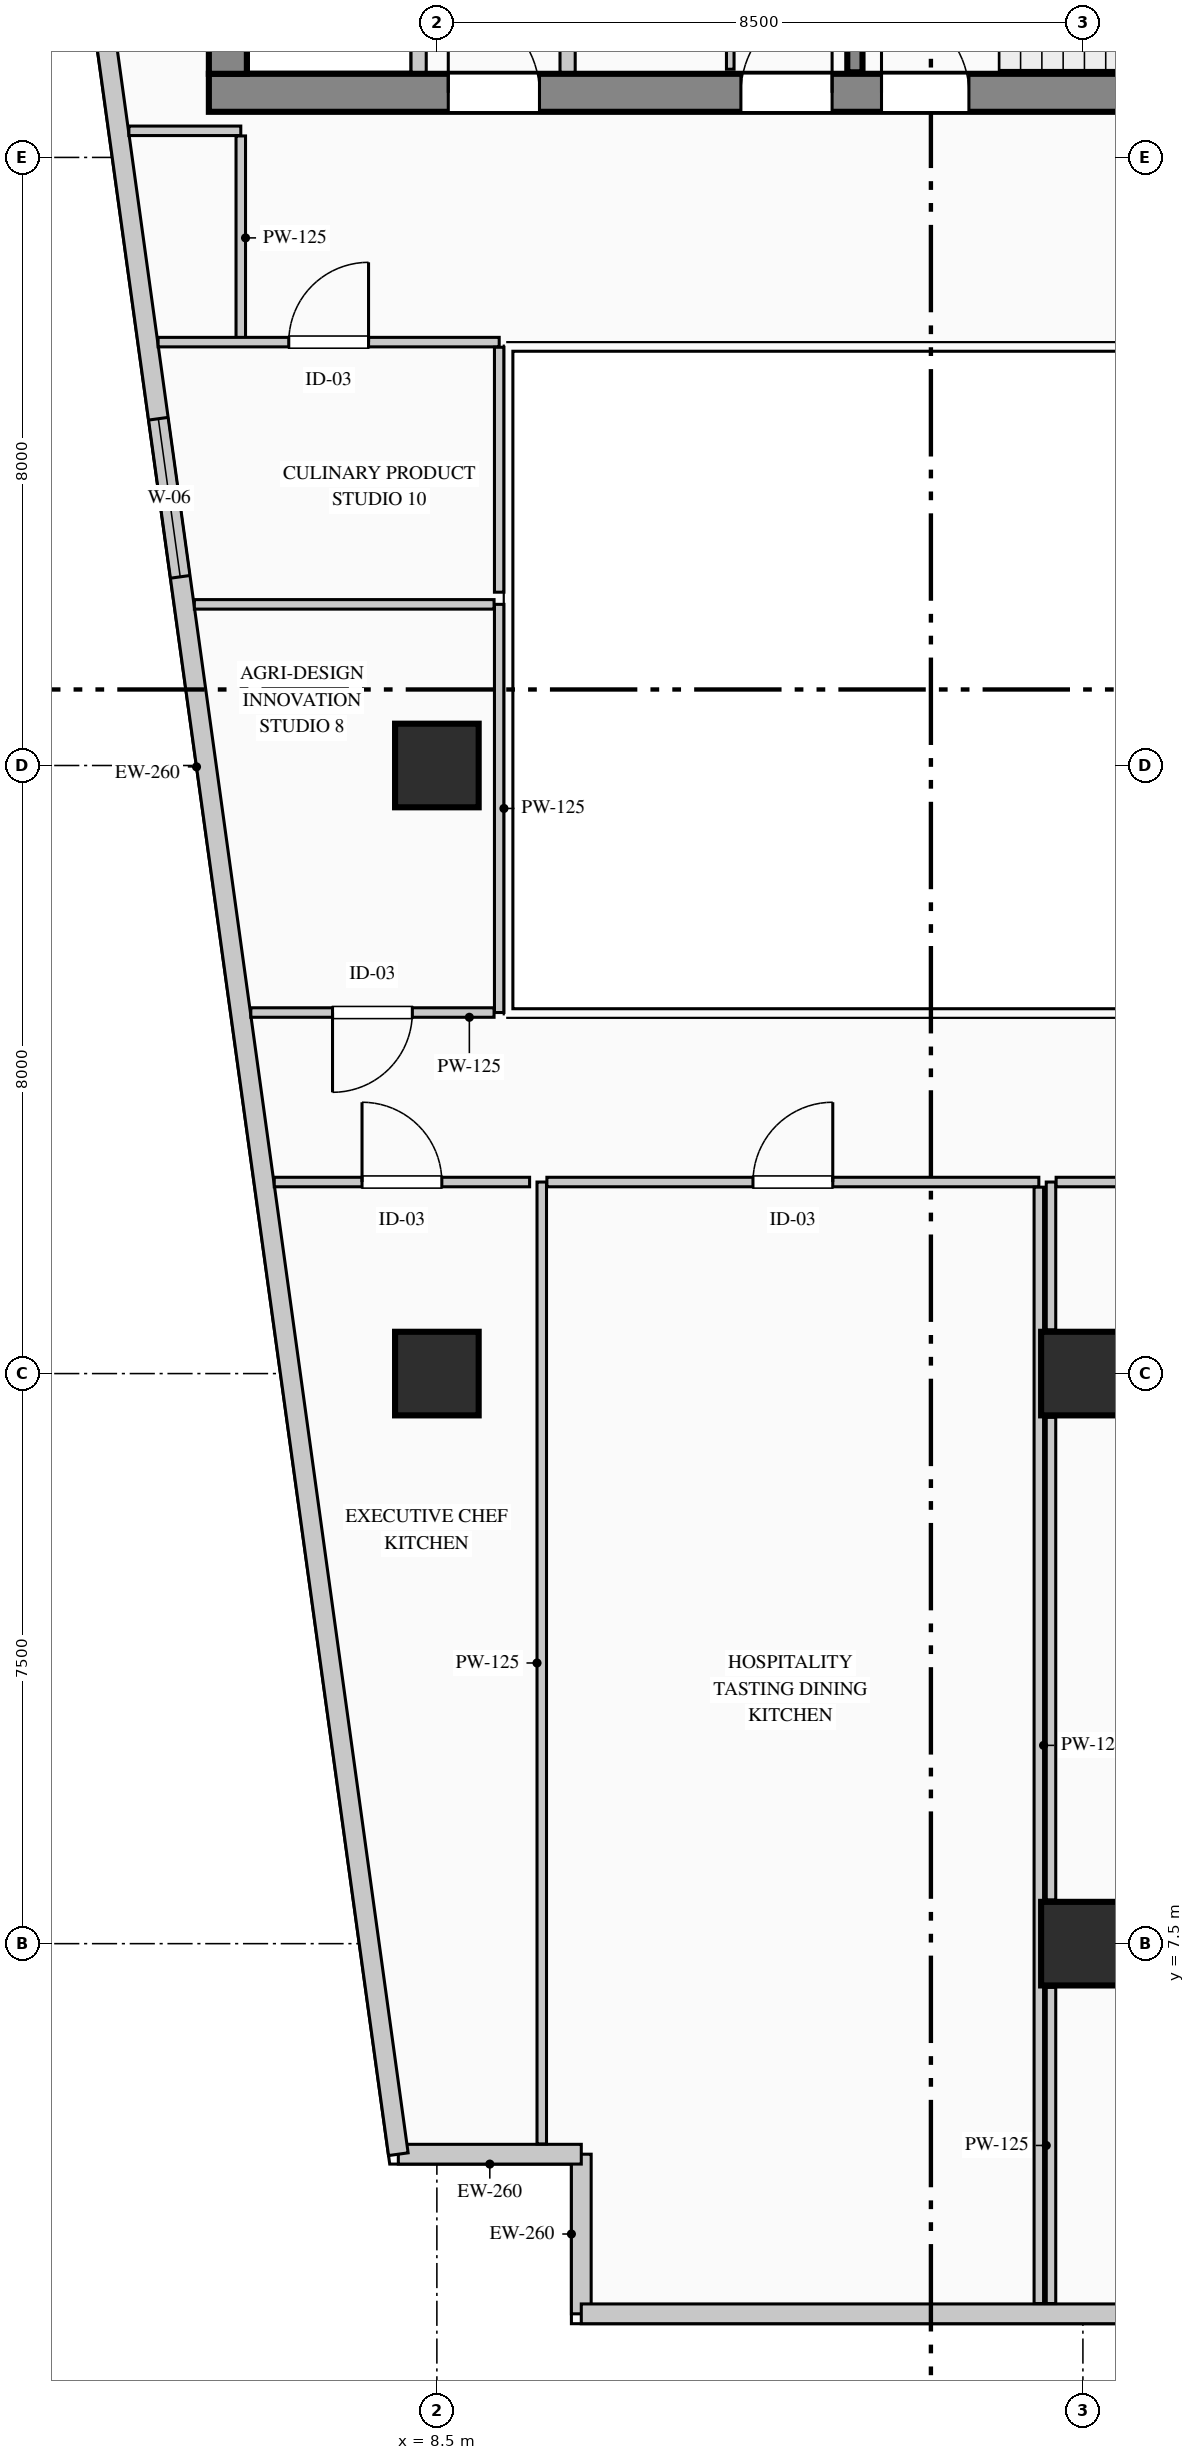
"""IFC4 building model, lengths in metres.
Left out: names, types, materials, properties, quantities, classifications, styles, units other than length and angle.
Written with IfcOpenShell. Run it as: python <this file> out.ifc"""

import sys

from ifc_helpers import new_model, si_unit, direction, frame, frame_2d, origin, origin_2d, place, context, subcontext, project, spatial, rectangle, extrude, element, fill, save


model = new_model("IFC4")
c1 = context("Model", 3, precision=1e-05, world=origin(), true_north=direction((0.0, 1.0)))
c2 = subcontext(c1, "Body", "Model", "MODEL_VIEW")
j1 = project(units=[si_unit("LENGTHUNIT", "METRE"), si_unit("PLANEANGLEUNIT", "RADIAN")], contexts=[c1])
p1 = place(None, origin())
s1 = spatial("IfcSite", under=j1, at=p1, CompositionType="ELEMENT")
p2 = place(p1, origin())
s2 = spatial("IfcBuilding", under=s1, at=p2, CompositionType="ELEMENT")
p3 = place(p2, frame((0.0, 0.0, 170.65)))
s3 = spatial("IfcBuildingStorey", under=s2, at=p3, CompositionType="ELEMENT", Elevation=170.65)
p4 = place(p3, frame((5.5, 31.85, 0.0), z_axis=(0.0, 0.0, 1.0), x_axis=(1.0, 0.0, 0.0)))
e1 = element("IfcWall", 1, at=p4, inside=s3, PredefinedType="SHEAR", context=c2, shape_type="SweptSolid", body=[
    extrude(rectangle(XDim=17.85, YDim=0.5, at=frame_2d((8.925, 0.0))), origin(), (0.0, 0.0, 1.0), 3.95),
])
p5 = place(p4, frame((3.15, 0.0, 0.0)))
e2 = element("IfcOpeningElement", 2, at=p5, cuts=e1, PredefinedType="OPENING", context=c2, shape_type="SweptSolid", body=[
    extrude(rectangle(XDim=1.2, YDim=2.2, at=frame_2d((0.6, 1.1))), frame((0.0, 0.26, 0.0), z_axis=(0.0, -1.0, 0.0), x_axis=(1.0, 0.0, 0.0)), (0.0, 0.0, 1.0), 0.52),
])
p6 = place(p4, frame((7.0, 0.0, 0.0)))
e3 = element("IfcOpeningElement", 3, at=p6, cuts=e1, PredefinedType="OPENING", context=c2, shape_type="SweptSolid", body=[
    extrude(rectangle(XDim=1.2, YDim=2.2, at=frame_2d((0.6, 1.1))), frame((0.0, 0.26, 0.0), z_axis=(0.0, -1.0, 0.0), x_axis=(1.0, 0.0, 0.0)), (0.0, 0.0, 1.0), 0.52),
])
p7 = place(p4, frame((8.85, 0.0, 0.0)))
e4 = element("IfcOpeningElement", 4, at=p7, cuts=e1, PredefinedType="OPENING", context=c2, shape_type="SweptSolid", body=[
    extrude(rectangle(XDim=1.15, YDim=2.2, at=frame_2d((0.575, 1.1))), frame((0.0, 0.26, 0.0), z_axis=(0.0, -1.0, 0.0), x_axis=(1.0, 0.0, 0.0)), (0.0, 0.0, 1.0), 0.52),
])
p8 = place(p4, frame((15.95, 0.0, 0.0)))
e5 = element("IfcOpeningElement", 5, at=p8, cuts=e1, PredefinedType="OPENING", context=c2, shape_type="SweptSolid", body=[
    extrude(rectangle(XDim=1.2, YDim=2.2, at=frame_2d((0.6, 1.1))), frame((0.0, 0.26, 0.0), z_axis=(0.0, -1.0, 0.0), x_axis=(1.0, 0.0, 0.0)), (0.0, 0.0, 1.0), 0.52),
])
p9 = place(p3, frame((5.75, 32.1, 0.0), z_axis=(0.0, 0.0, 1.0), x_axis=(0.0, 1.0, 0.0)))
e6 = element("IfcWall", 6, at=p9, inside=s3, PredefinedType="SHEAR", context=c2, shape_type="SweptSolid", body=[
    extrude(rectangle(XDim=8.3, YDim=0.5, at=frame_2d((4.15, 0.0))), origin(), (0.0, 0.0, 1.0), 3.95),
])
p10 = place(p3, frame((14.0, 32.12, 0.0), z_axis=(0.0, 0.0, 1.0), x_axis=(0.0, 1.0, 0.0)))
e7 = element("IfcWall", 7, at=p10, inside=s3, PredefinedType="SHEAR", context=c2, shape_type="SweptSolid", body=[
    extrude(rectangle(XDim=8.26, YDim=0.2, at=frame_2d((4.13, 0.0))), origin(), (0.0, 0.0, 1.0), 3.95),
])
p11 = place(p10, frame((4.46, 0.0, 0.0)))
e8 = element("IfcOpeningElement", 8, at=p11, cuts=e7, PredefinedType="OPENING", context=c2, shape_type="SweptSolid", body=[
    extrude(rectangle(XDim=1.15, YDim=2.2, at=frame_2d((0.575, 1.1))), frame((0.0, 0.11, 0.0), z_axis=(0.0, -1.0, 0.0), x_axis=(1.0, 0.0, 0.0)), (0.0, 0.0, 1.0), 0.22),
])
for number, where, z_axis, x_axis in (
    (9, (8.5, 15.0, 0.0), (0.0, 0.0, 1.0), (1.0, 0.0, 0.0)),
    (10, (8.5, 23.0, 0.0), (0.0, 0.0, 1.0), (1.0, 0.0, 0.0)),
    (11, (17.0, 7.5, 0.0), (0.0, 0.0, 1.0), (1.0, 0.0, 0.0)),
    (12, (17.0, 15.0, 0.0), (0.0, 0.0, 1.0), (1.0, 0.0, 0.0)),
):
    element("IfcColumn", number, at=place(p3, frame(where, z_axis=z_axis, x_axis=x_axis)), inside=s3, PredefinedType="COLUMN", context=c2, shape_type="SweptSolid", body=[
        extrude(rectangle(XDim=1.1, YDim=1.1, at=origin_2d()), origin(), (0.0, 0.0, 1.0), 3.95),
    ])
p12 = place(p3, frame((10.4, 2.63, 0.0), z_axis=(0.0, 0.0, 1.0), x_axis=(0.0, 1.0, 0.0)))
e13 = element("IfcWall", 13, at=p12, inside=s3, PredefinedType="STANDARD", context=c2, shape_type="SweptSolid", body=[
    extrude(rectangle(XDim=2.1, YDim=0.26, at=frame_2d((1.05, 0.0))), origin(), (0.0, 0.0, 1.0), 3.69),
])
p13 = place(p3, frame((10.4, 4.73, 0.0), z_axis=(0.0, 0.0, 1.0), x_axis=(-1.0, 0.0, 0.0)))
e14 = element("IfcWall", 14, at=p13, inside=s3, PredefinedType="STANDARD", context=c2, shape_type="SweptSolid", body=[
    extrude(rectangle(XDim=2.407, YDim=0.26, at=frame_2d((1.204, 0.0))), origin(), (0.0, 0.0, 1.0), 3.69),
])
p14 = place(p3, frame((7.993, 4.73, 0.0), z_axis=(0.0, 0.0, 1.0), x_axis=(-0.136989009016, 0.990572567462, 0.0)))
e15 = element("IfcWall", 15, at=p14, inside=s3, PredefinedType="STANDARD", context=c2, shape_type="SweptSolid", body=[
    extrude(rectangle(XDim=36.888, YDim=0.26, at=frame_2d((18.444, 0.0))), origin(), (0.0, 0.0, 1.0), 3.69),
])
p15 = place(p14, frame((20.949, 0.0, 0.9)))
e16 = element("IfcOpeningElement", 16, at=p15, cuts=e15, PredefinedType="OPENING", context=c2, shape_type="SweptSolid", body=[
    extrude(rectangle(XDim=2.1, YDim=2.0, at=frame_2d((1.05, 1.0))), frame((0.0, 0.14, 0.0), z_axis=(0.0, -1.0, 0.0), x_axis=(1.0, 0.0, 0.0)), (0.0, 0.0, 1.0), 0.28),
])
p16 = place(p3, frame((24.11, 2.63, 0.0), z_axis=(0.0, 0.0, 1.0), x_axis=(-1.0, 0.0, 0.0)))
e17 = element("IfcWall", 17, at=p16, inside=s3, PredefinedType="STANDARD", context=c2, shape_type="SweptSolid", body=[
    extrude(rectangle(XDim=13.71, YDim=0.26, at=frame_2d((6.855, 0.0))), origin(), (0.0, 0.0, 1.0), 3.69),
])
p17 = place(p16, frame((3.886, 0.0, 0.9)))
e18 = element("IfcOpeningElement", 18, at=p17, cuts=e17, PredefinedType="OPENING", context=c2, shape_type="SweptSolid", body=[
    extrude(rectangle(XDim=2.1, YDim=2.0, at=frame_2d((1.05, 1.0))), frame((0.0, 0.14, 0.0), z_axis=(0.0, -1.0, 0.0), x_axis=(1.0, 0.0, 0.0)), (0.0, 0.0, 1.0), 0.28),
])
p18 = place(p3, frame((8.26, 32.12, 0.0), z_axis=(0.0, 0.0, 1.0), x_axis=(0.0, 1.0, 0.0)))
e19 = element("IfcWall", 19, at=p18, inside=s3, PredefinedType="PARTITIONING", context=c2, shape_type="SweptSolid", body=[
    extrude(rectangle(XDim=7.5, YDim=0.2, at=frame_2d((3.75, 0.0))), origin(), (0.0, 0.0, 1.0), 3.69),
])
p19 = place(p3, frame((10.22, 32.12, 0.0), z_axis=(0.0, 0.0, 1.0), x_axis=(0.0, 1.0, 0.0)))
e20 = element("IfcWall", 20, at=p19, inside=s3, PredefinedType="PARTITIONING", context=c2, shape_type="SweptSolid", body=[
    extrude(rectangle(XDim=8.26, YDim=0.2, at=frame_2d((4.13, 0.0))), origin(), (0.0, 0.0, 1.0), 3.69),
])
p20 = place(p3, frame((12.36, 32.16, 0.0), z_axis=(0.0, 0.0, 1.0), x_axis=(0.0, 1.0, 0.0)))
e21 = element("IfcWall", 21, at=p20, inside=s3, PredefinedType="PARTITIONING", context=c2, shape_type="SweptSolid", body=[
    extrude(rectangle(XDim=1.62, YDim=0.1, at=frame_2d((0.81, 0.0))), origin(), (0.0, 0.0, 1.0), 3.69),
])
p21 = place(p20, frame((0.38, 0.0, 0.0)))
e22 = element("IfcOpeningElement", 22, at=p21, cuts=e21, PredefinedType="OPENING", context=c2, shape_type="SweptSolid", body=[
    extrude(rectangle(XDim=0.85, YDim=2.1, at=frame_2d((0.425, 1.05))), frame((0.0, 0.06, 0.0), z_axis=(0.0, -1.0, 0.0), x_axis=(1.0, 0.0, 0.0)), (0.0, 0.0, 1.0), 0.12),
])
p22 = place(p3, frame((16.58, 2.765, 0.0), z_axis=(0.0, 0.0, 1.0), x_axis=(0.0, 1.0, 0.0)))
e23 = element("IfcWall", 23, at=p22, inside=s3, PredefinedType="PARTITIONING", context=c2, shape_type="SweptSolid", body=[
    extrude(rectangle(XDim=4.16, YDim=0.125, at=frame_2d((2.08, 0.0))), origin(), (0.0, 0.0, 1.0), 3.69),
])
p23 = place(p3, frame((16.58, 8.075, 0.0), z_axis=(0.0, 0.0, 1.0), x_axis=(0.0, 1.0, 0.0)))
e24 = element("IfcWall", 24, at=p23, inside=s3, PredefinedType="PARTITIONING", context=c2, shape_type="SweptSolid", body=[
    extrude(rectangle(XDim=6.35, YDim=0.125, at=frame_2d((3.175, 0.0))), origin(), (0.0, 0.0, 1.0), 3.69),
])
p24 = place(p3, frame((16.58, 15.575, 0.0), z_axis=(0.0, 0.0, 1.0), x_axis=(0.0, 1.0, 0.0)))
e25 = element("IfcWall", 25, at=p24, inside=s3, PredefinedType="PARTITIONING", context=c2, shape_type="SweptSolid", body=[
    extrude(rectangle(XDim=1.945, YDim=0.125, at=frame_2d((0.973, 0.0))), origin(), (0.0, 0.0, 1.0), 3.69),
])
p25 = place(p3, frame((16.647, 17.52, 0.0), z_axis=(0.0, 0.0, 1.0), x_axis=(1.0, 0.0, 0.0)))
e26 = element("IfcWall", 26, at=p25, inside=s3, PredefinedType="PARTITIONING", context=c2, shape_type="SweptSolid", body=[
    extrude(rectangle(XDim=7.473, YDim=0.125, at=frame_2d((3.736, 0.0))), origin(), (0.0, 0.0, 1.0), 3.69),
])
p26 = place(p25, frame((3.211, 0.0, 0.0)))
e27 = element("IfcOpeningElement", 27, at=p26, cuts=e26, PredefinedType="OPENING", context=c2, shape_type="SweptSolid", body=[
    extrude(rectangle(XDim=1.05, YDim=2.15, at=frame_2d((0.525, 1.075))), frame((0.0, 0.073, 0.0), z_axis=(0.0, -1.0, 0.0), x_axis=(1.0, 0.0, 0.0)), (0.0, 0.0, 1.0), 0.145),
])
p27 = place(p3, frame((9.88, 4.865, 0.0), z_axis=(0.0, 0.0, 1.0), x_axis=(0.0, 1.0, 0.0)))
e28 = element("IfcWall", 28, at=p27, inside=s3, PredefinedType="PARTITIONING", context=c2, shape_type="SweptSolid", body=[
    extrude(rectangle(XDim=12.655, YDim=0.125, at=frame_2d((6.328, 0.0))), origin(), (0.0, 0.0, 1.0), 3.69),
])
p28 = place(p3, frame((9.948, 17.52, 0.0), z_axis=(0.0, 0.0, 1.0), x_axis=(1.0, 0.0, 0.0)))
e29 = element("IfcWall", 29, at=p28, inside=s3, PredefinedType="PARTITIONING", context=c2, shape_type="SweptSolid", body=[
    extrude(rectangle(XDim=6.472, YDim=0.125, at=frame_2d((3.236, 0.0))), origin(), (0.0, 0.0, 1.0), 3.69),
])
p29 = place(p28, frame((2.711, 0.0, 0.0)))
e30 = element("IfcOpeningElement", 30, at=p29, cuts=e29, PredefinedType="OPENING", context=c2, shape_type="SweptSolid", body=[
    extrude(rectangle(XDim=1.05, YDim=2.15, at=frame_2d((0.525, 1.075))), frame((0.0, 0.073, 0.0), z_axis=(0.0, -1.0, 0.0), x_axis=(1.0, 0.0, 0.0)), (0.0, 0.0, 1.0), 0.145),
])
p30 = place(p3, frame((16.42, 17.452, 0.0), z_axis=(0.0, 0.0, 1.0), x_axis=(0.0, -1.0, 0.0)))
e31 = element("IfcWall", 31, at=p30, inside=s3, PredefinedType="PARTITIONING", context=c2, shape_type="SweptSolid", body=[
    extrude(rectangle(XDim=14.688, YDim=0.125, at=frame_2d((7.344, 0.0))), origin(), (0.0, 0.0, 1.0), 3.69),
])
p31 = place(p3, frame((6.36, 17.52, 0.0), z_axis=(0.0, 0.0, 1.0), x_axis=(1.0, 0.0, 0.0)))
e32 = element("IfcWall", 32, at=p31, inside=s3, PredefinedType="PARTITIONING", context=c2, shape_type="SweptSolid", body=[
    extrude(rectangle(XDim=3.36, YDim=0.125, at=frame_2d((1.68, 0.0))), origin(), (0.0, 0.0, 1.0), 3.69),
])
p32 = place(p31, frame((1.155, 0.0, 0.0)))
e33 = element("IfcOpeningElement", 33, at=p32, cuts=e32, PredefinedType="OPENING", context=c2, shape_type="SweptSolid", body=[
    extrude(rectangle(XDim=1.05, YDim=2.15, at=frame_2d((0.525, 1.075))), frame((0.0, 0.073, 0.0), z_axis=(0.0, -1.0, 0.0), x_axis=(1.0, 0.0, 0.0)), (0.0, 0.0, 1.0), 0.145),
])
p33 = place(p3, frame((9.32, 25.12, 0.0), z_axis=(0.0, 0.0, 1.0), x_axis=(0.0, -1.0, 0.0)))
e34 = element("IfcWall", 34, at=p33, inside=s3, PredefinedType="PARTITIONING", context=c2, shape_type="SweptSolid", body=[
    extrude(rectangle(XDim=5.37, YDim=0.125, at=frame_2d((2.685, 0.0))), origin(), (0.0, 0.0, 1.0), 3.475),
])
p34 = place(p3, frame((9.252, 19.75, 0.0), z_axis=(0.0, 0.0, 1.0), x_axis=(-1.0, 0.0, 0.0)))
e35 = element("IfcWall", 35, at=p34, inside=s3, PredefinedType="PARTITIONING", context=c2, shape_type="SweptSolid", body=[
    extrude(rectangle(XDim=3.2, YDim=0.125, at=frame_2d((1.6, 0.0))), origin(), (0.0, 0.0, 1.0), 3.69),
])
p35 = place(p34, frame((1.075, 0.0, 0.0)))
e36 = element("IfcOpeningElement", 36, at=p35, cuts=e35, PredefinedType="OPENING", context=c2, shape_type="SweptSolid", body=[
    extrude(rectangle(XDim=1.05, YDim=2.15, at=frame_2d((0.525, 1.075))), frame((0.0, 0.073, 0.0), z_axis=(0.0, -1.0, 0.0), x_axis=(1.0, 0.0, 0.0)), (0.0, 0.0, 1.0), 0.145),
])
p36 = place(p3, frame((5.309, 25.12, 0.0), z_axis=(0.0, 0.0, 1.0), x_axis=(1.0, 0.0, 0.0)))
e37 = element("IfcWall", 37, at=p36, inside=s3, PredefinedType="PARTITIONING", context=c2, shape_type="SweptSolid", body=[
    extrude(rectangle(XDim=3.943, YDim=0.125, at=frame_2d((1.972, 0.0))), origin(), (0.0, 0.0, 1.0), 3.69),
])
p37 = place(p3, frame((4.448, 31.35, 0.0), z_axis=(0.0, 0.0, 1.0), x_axis=(1.0, 0.0, 0.0)))
e38 = element("IfcWall", 38, at=p37, inside=s3, PredefinedType="PARTITIONING", context=c2, shape_type="SweptSolid", body=[
    extrude(rectangle(XDim=1.472, YDim=0.125, at=frame_2d((0.736, 0.0))), origin(), (0.0, 0.0, 1.0), 3.69),
])
p38 = place(p3, frame((5.92, 31.282, 0.0), z_axis=(0.0, 0.0, 1.0), x_axis=(0.0, -1.0, 0.0)))
e39 = element("IfcWall", 39, at=p38, inside=s3, PredefinedType="PARTITIONING", context=c2, shape_type="SweptSolid", body=[
    extrude(rectangle(XDim=2.682, YDim=0.125, at=frame_2d((1.341, 0.0))), origin(), (0.0, 0.0, 1.0), 3.69),
])
p39 = place(p3, frame((4.832, 28.57, 0.0), z_axis=(0.0, 0.0, 1.0), x_axis=(1.0, 0.0, 0.0)))
e40 = element("IfcWall", 40, at=p39, inside=s3, PredefinedType="PARTITIONING", context=c2, shape_type="SweptSolid", body=[
    extrude(rectangle(XDim=4.488, YDim=0.125, at=frame_2d((2.244, 0.0))), origin(), (0.0, 0.0, 1.0), 3.69),
])
p40 = place(p39, frame((1.719, 0.0, 0.0)))
e41 = element("IfcOpeningElement", 41, at=p40, cuts=e40, PredefinedType="OPENING", context=c2, shape_type="SweptSolid", body=[
    extrude(rectangle(XDim=1.05, YDim=2.15, at=frame_2d((0.525, 1.075))), frame((0.0, 0.073, 0.0), z_axis=(0.0, -1.0, 0.0), x_axis=(1.0, 0.0, 0.0)), (0.0, 0.0, 1.0), 0.145),
])
p41 = place(p3, frame((9.32, 28.502, 0.0), z_axis=(0.0, 0.0, 1.0), x_axis=(0.0, -1.0, 0.0)))
e42 = element("IfcWall", 42, at=p41, inside=s3, PredefinedType="PARTITIONING", context=c2, shape_type="SweptSolid", body=[
    extrude(rectangle(XDim=3.222, YDim=0.125, at=frame_2d((1.611, 0.0))), origin(), (0.0, 0.0, 1.0), 3.475),
])
p42 = place(p15, origin())
e43 = element("IfcWindow", 43, at=p42, inside=s3, PartitioningType="DOUBLE_PANEL_VERTICAL", PredefinedType="WINDOW", context=c2, shape_type="SweptSolid", body=[
    extrude(rectangle(XDim=2.1, YDim=2.0, at=frame_2d((1.05, 1.0))), frame((0.0, 0.03, 0.0), z_axis=(0.0, -1.0, 0.0), x_axis=(1.0, 0.0, 0.0)), (0.0, 0.0, 1.0), 0.06),
])
fill(e16, e43)
p43 = place(p5, origin())
e44 = element("IfcDoor", 44, at=p43, inside=s3, OperationType="SINGLE_SWING_LEFT", PredefinedType="DOOR", context=c2, shape_type="SweptSolid", body=[
    extrude(rectangle(XDim=1.2, YDim=2.2, at=frame_2d((0.6, 1.1))), frame((0.0, 0.025, 0.0), z_axis=(0.0, -1.0, 0.0), x_axis=(1.0, 0.0, 0.0)), (0.0, 0.0, 1.0), 0.05),
])
fill(e2, e44)
p44 = place(p6, origin())
e45 = element("IfcDoor", 45, at=p44, inside=s3, OperationType="SINGLE_SWING_RIGHT", PredefinedType="DOOR", context=c2, shape_type="SweptSolid", body=[
    extrude(rectangle(XDim=1.2, YDim=2.2, at=frame_2d((0.6, 1.1))), frame((0.0, 0.025, 0.0), z_axis=(0.0, -1.0, 0.0), x_axis=(1.0, 0.0, 0.0)), (0.0, 0.0, 1.0), 0.05),
])
fill(e3, e45)
p45 = place(p7, origin())
e46 = element("IfcDoor", 46, at=p45, inside=s3, OperationType="SINGLE_SWING_LEFT", PredefinedType="DOOR", context=c2, shape_type="SweptSolid", body=[
    extrude(rectangle(XDim=1.15, YDim=2.2, at=frame_2d((0.575, 1.1))), frame((0.0, 0.025, 0.0), z_axis=(0.0, -1.0, 0.0), x_axis=(1.0, 0.0, 0.0)), (0.0, 0.0, 1.0), 0.05),
])
fill(e4, e46)
p46 = place(p29, origin())
e47 = element("IfcDoor", 47, at=p46, inside=s3, OperationType="SINGLE_SWING_RIGHT", PredefinedType="DOOR", context=c2, shape_type="SweptSolid", body=[
    extrude(rectangle(XDim=1.05, YDim=2.15, at=frame_2d((0.525, 1.075))), frame((0.0, 0.025, 0.0), z_axis=(0.0, -1.0, 0.0), x_axis=(1.0, 0.0, 0.0)), (0.0, 0.0, 1.0), 0.05),
])
fill(e30, e47)
p47 = place(p32, origin())
e48 = element("IfcDoor", 48, at=p47, inside=s3, OperationType="SINGLE_SWING_LEFT", PredefinedType="DOOR", context=c2, shape_type="SweptSolid", body=[
    extrude(rectangle(XDim=1.05, YDim=2.15, at=frame_2d((0.525, 1.075))), frame((0.0, 0.025, 0.0), z_axis=(0.0, -1.0, 0.0), x_axis=(1.0, 0.0, 0.0)), (0.0, 0.0, 1.0), 0.05),
])
fill(e33, e48)
p48 = place(p35, origin())
e49 = element("IfcDoor", 49, at=p48, inside=s3, OperationType="SINGLE_SWING_RIGHT", PredefinedType="DOOR", context=c2, shape_type="SweptSolid", body=[
    extrude(rectangle(XDim=1.05, YDim=2.15, at=frame_2d((0.525, 1.075))), frame((0.0, 0.025, 0.0), z_axis=(0.0, -1.0, 0.0), x_axis=(1.0, 0.0, 0.0)), (0.0, 0.0, 1.0), 0.05),
])
fill(e36, e49)
p49 = place(p40, origin())
e50 = element("IfcDoor", 50, at=p49, inside=s3, OperationType="SINGLE_SWING_RIGHT", PredefinedType="DOOR", context=c2, shape_type="SweptSolid", body=[
    extrude(rectangle(XDim=1.05, YDim=2.15, at=frame_2d((0.525, 1.075))), frame((0.0, 0.025, 0.0), z_axis=(0.0, -1.0, 0.0), x_axis=(1.0, 0.0, 0.0)), (0.0, 0.0, 1.0), 0.05),
])
fill(e41, e50)
save(model, sys.argv[1])
